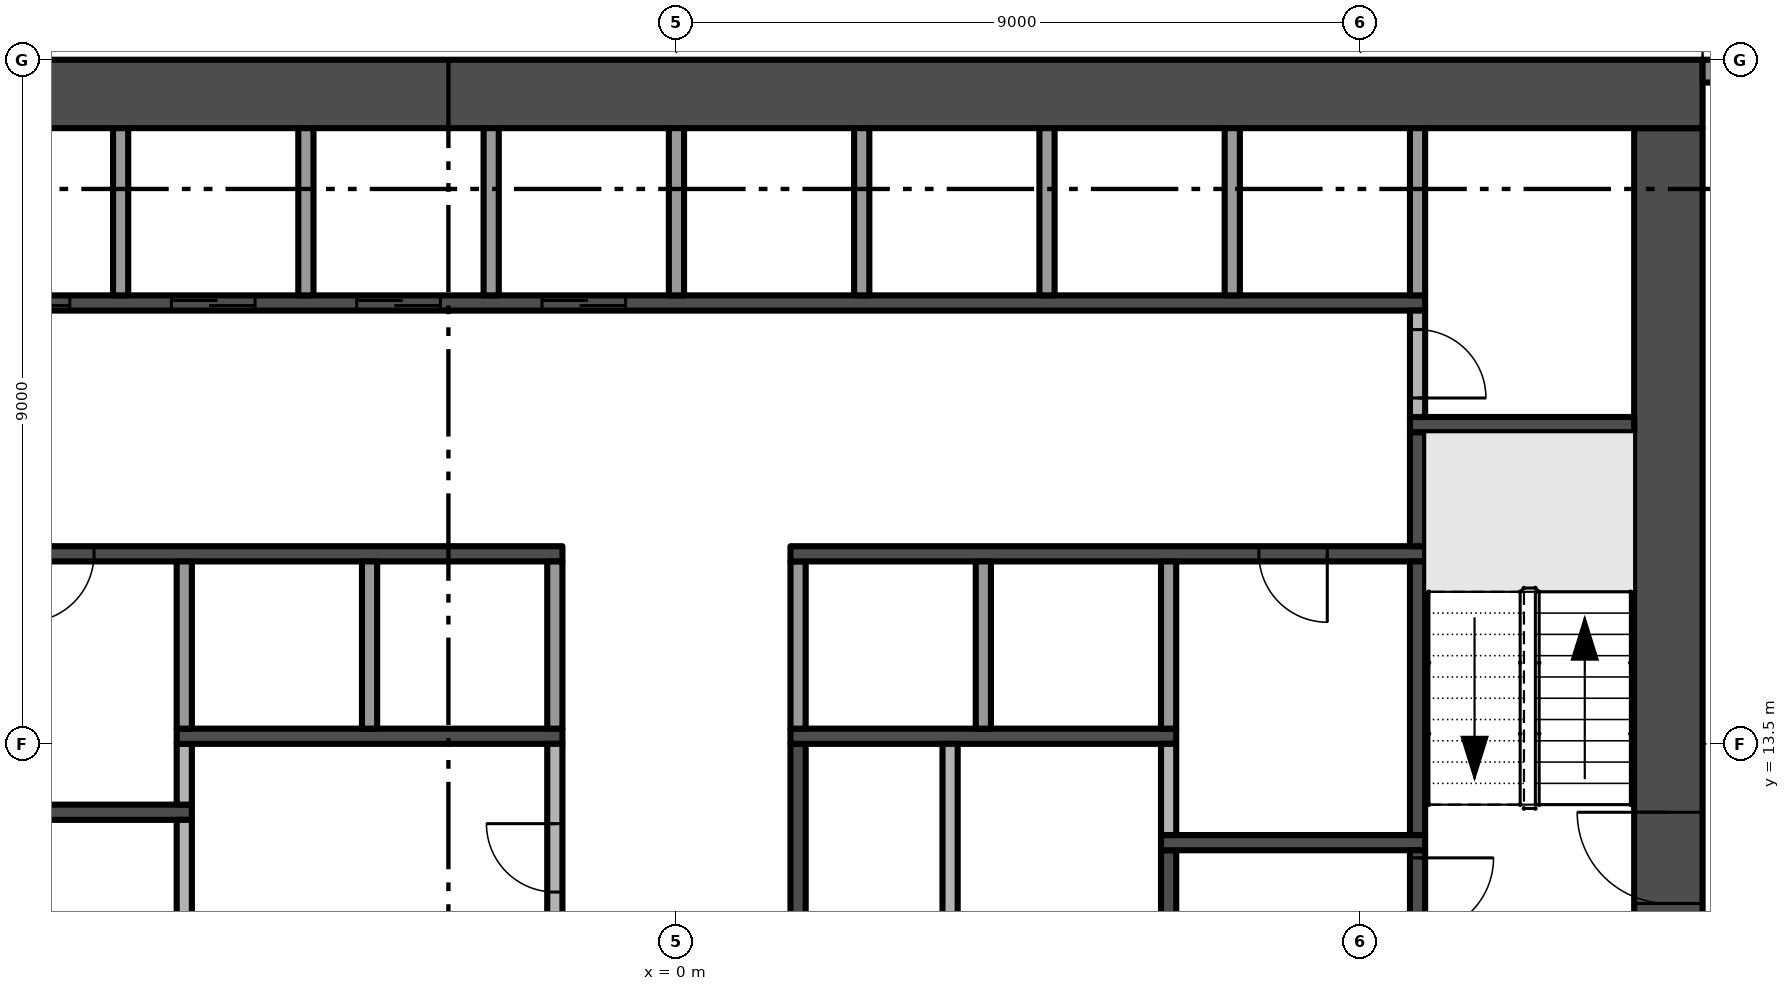
"""IFC4 building model, lengths in metres.
Left out: names, types, materials, properties, quantities, classifications, styles, units other than length and angle.
Written with IfcOpenShell. Run it as: python <this file> out.ifc"""

import sys

from ifc_helpers import new_model, si_unit, direction, frame, frame_2d, origin, place, context, subcontext, project, spatial, rectangle, extrude, element, fill, save


model = new_model("IFC4")
c1 = context("Model", 3, precision=1e-05, world=origin(), true_north=direction((0.0, 1.0)))
c2 = subcontext(c1, "Body", "Model", "MODEL_VIEW")
j1 = project(units=[si_unit("LENGTHUNIT", "METRE"), si_unit("PLANEANGLEUNIT", "RADIAN")], contexts=[c1])
p1 = place(None, origin())
s1 = spatial("IfcSite", under=j1, at=p1, CompositionType="ELEMENT")
p2 = place(p1, origin())
s2 = spatial("IfcBuilding", under=s1, at=p2, CompositionType="ELEMENT")
p3 = place(p2, frame((0.0, 0.0, 111.2)))
s3 = spatial("IfcBuildingStorey", under=s2, at=p3, CompositionType="ELEMENT", Elevation=111.2)
p4 = place(p3, frame((13.05, 5.4, -0.3), z_axis=(0.0, 0.0, 1.0), x_axis=(0.0, 1.0, 0.0)))
e1 = element("IfcWall", 1, at=p4, inside=s3, PredefinedType="SHEAR", context=c2, shape_type="SweptSolid", body=[
    extrude(rectangle(XDim=16.2, YDim=0.9, at=frame_2d((8.1, 0.0))), origin(), (0.0, 0.0, 1.0), 3.8),
])
p5 = place(p4, frame((6.0, 0.0, 0.3)))
e2 = element("IfcOpeningElement", 2, at=p5, cuts=e1, PredefinedType="OPENING", context=c2, shape_type="SweptSolid", body=[
    extrude(rectangle(XDim=1.2, YDim=2.2, at=frame_2d((0.6, 1.1))), frame((0.0, 0.46, 0.0), z_axis=(0.0, -1.0, 0.0), x_axis=(1.0, 0.0, 0.0)), (0.0, 0.0, 1.0), 0.92),
])
p6 = place(p3, frame((13.5, 22.05, -0.3), z_axis=(0.0, 0.0, 1.0), x_axis=(-1.0, 0.0, 0.0)))
e3 = element("IfcWall", 3, at=p6, inside=s3, PredefinedType="SHEAR", context=c2, shape_type="SweptSolid", body=[
    extrude(rectangle(XDim=27.0, YDim=0.9, at=frame_2d((13.5, 0.0))), origin(), (0.0, 0.0, 1.0), 3.8),
])
p7 = place(p3, frame((13.5, 22.35, 0.0), z_axis=(0.0, 0.0, 1.0), x_axis=(1.0, 0.0, 0.0)))
e4 = element("IfcWall", 4, at=p7, inside=s3, PredefinedType="SOLIDWALL", context=c2, shape_type="SweptSolid", body=[
    extrude(rectangle(XDim=3.875, YDim=0.3, at=frame_2d((1.938, 0.0))), origin(), (0.0, 0.0, 1.0), 3.5),
])
p8 = place(p7, frame((0.775, 0.0, 0.45)))
e5 = element("IfcOpeningElement", 5, at=p8, cuts=e4, PredefinedType="OPENING", context=c2, shape_type="SweptSolid", body=[
    extrude(rectangle(XDim=2.775, YDim=2.65, at=frame_2d((1.387, 1.325))), frame((0.0, 0.16, 0.0), z_axis=(0.0, -1.0, 0.0), x_axis=(1.0, 0.0, 0.0)), (0.0, 0.0, 1.0), 0.32),
])
p9 = place(p3, frame((-9.85, 12.6, 0.0), z_axis=(0.0, 0.0, 1.0), x_axis=(1.0, 0.0, 0.0)))
e6 = element("IfcWall", 6, at=p9, inside=s3, PredefinedType="SHEAR", context=c2, shape_type="SweptSolid", body=[
    extrude(rectangle(XDim=3.475, YDim=0.2, at=frame_2d((1.738, 0.0))), origin(), (0.0, 0.0, 1.0), 3.5),
])
p10 = place(p3, frame((-1.5, 16.0, 0.0), z_axis=(0.0, 0.0, 1.0), x_axis=(-1.0, 0.0, 0.0)))
e7 = element("IfcWall", 7, at=p10, inside=s3, PredefinedType="SHEAR", context=c2, shape_type="SweptSolid", body=[
    extrude(rectangle(XDim=8.35, YDim=0.2, at=frame_2d((4.175, 0.0))), origin(), (0.0, 0.0, 1.0), 3.5),
])
p11 = place(p10, frame((6.162, 0.0, 0.0)))
e8 = element("IfcOpeningElement", 8, at=p11, cuts=e7, PredefinedType="OPENING", context=c2, shape_type="SweptSolid", body=[
    extrude(rectangle(XDim=0.9, YDim=2.1, at=frame_2d((0.45, 1.05))), frame((0.0, 0.11, 0.0), z_axis=(0.0, -1.0, 0.0), x_axis=(1.0, 0.0, 0.0)), (0.0, 0.0, 1.0), 0.22),
])
p12 = place(p3, frame((-9.85, 19.3, 0.0), z_axis=(0.0, 0.0, 1.0), x_axis=(1.0, 0.0, 0.0)))
e9 = element("IfcWall", 9, at=p12, inside=s3, PredefinedType="SHEAR", context=c2, shape_type="SweptSolid", body=[
    extrude(rectangle(XDim=19.7, YDim=0.2, at=frame_2d((9.85, 0.0))), origin(), (0.0, 0.0, 1.0), 3.5),
])
p13 = place(p12, frame((0.769, 0.0, 0.0)))
e10 = element("IfcOpeningElement", 10, at=p13, cuts=e9, PredefinedType="OPENING", context=c2, shape_type="SweptSolid", body=[
    extrude(rectangle(XDim=1.1, YDim=2.1, at=frame_2d((0.55, 1.05))), frame((0.0, 0.11, 0.0), z_axis=(0.0, -1.0, 0.0), x_axis=(1.0, 0.0, 0.0)), (0.0, 0.0, 1.0), 0.22),
])
p14 = place(p12, frame((3.206, 0.0, 0.0)))
e11 = element("IfcOpeningElement", 11, at=p14, cuts=e9, PredefinedType="OPENING", context=c2, shape_type="SweptSolid", body=[
    extrude(rectangle(XDim=1.1, YDim=2.1, at=frame_2d((0.55, 1.05))), frame((0.0, 0.11, 0.0), z_axis=(0.0, -1.0, 0.0), x_axis=(1.0, 0.0, 0.0)), (0.0, 0.0, 1.0), 0.22),
])
p15 = place(p12, frame((5.644, 0.0, 0.0)))
e12 = element("IfcOpeningElement", 12, at=p15, cuts=e9, PredefinedType="OPENING", context=c2, shape_type="SweptSolid", body=[
    extrude(rectangle(XDim=1.1, YDim=2.1, at=frame_2d((0.55, 1.05))), frame((0.0, 0.11, 0.0), z_axis=(0.0, -1.0, 0.0), x_axis=(1.0, 0.0, 0.0)), (0.0, 0.0, 1.0), 0.22),
])
p16 = place(p12, frame((8.081, 0.0, 0.0)))
e13 = element("IfcOpeningElement", 13, at=p16, cuts=e9, PredefinedType="OPENING", context=c2, shape_type="SweptSolid", body=[
    extrude(rectangle(XDim=1.1, YDim=2.1, at=frame_2d((0.55, 1.05))), frame((0.0, 0.11, 0.0), z_axis=(0.0, -1.0, 0.0), x_axis=(1.0, 0.0, 0.0)), (0.0, 0.0, 1.0), 0.22),
])
p17 = place(p3, frame((-7.312, 19.4, 0.0), z_axis=(0.0, 0.0, 1.0), x_axis=(0.0, 1.0, 0.0)))
e14 = element("IfcWall", 14, at=p17, inside=s3, PredefinedType="PARTITIONING", context=c2, shape_type="SweptSolid", body=[
    extrude(rectangle(XDim=2.2, YDim=0.2, at=frame_2d((1.1, 0.0))), origin(), (0.0, 0.0, 1.0), 3.5),
])
p18 = place(p3, frame((-6.475, 10.5, 0.0), z_axis=(0.0, 0.0, 1.0), x_axis=(0.0, 1.0, 0.0)))
e15 = element("IfcWall", 15, at=p18, inside=s3, PredefinedType="PARTITIONING", context=c2, shape_type="SweptSolid", body=[
    extrude(rectangle(XDim=2.0, YDim=0.2, at=frame_2d((1.0, 0.0))), origin(), (0.0, 0.0, 1.0), 3.5),
])
p19 = place(p3, frame((-6.475, 12.7, 0.0), z_axis=(0.0, 0.0, 1.0), x_axis=(0.0, 1.0, 0.0)))
e16 = element("IfcWall", 16, at=p19, inside=s3, PredefinedType="PARTITIONING", context=c2, shape_type="SweptSolid", body=[
    extrude(rectangle(XDim=0.8, YDim=0.2, at=frame_2d((0.4, 0.0))), origin(), (0.0, 0.0, 1.0), 3.5),
])
p20 = place(p3, frame((-6.575, 13.6, 0.0), z_axis=(0.0, 0.0, 1.0), x_axis=(1.0, 0.0, 0.0)))
e17 = element("IfcWall", 17, at=p20, inside=s3, PredefinedType="SHEAR", context=c2, shape_type="SweptSolid", body=[
    extrude(rectangle(XDim=5.075, YDim=0.2, at=frame_2d((2.538, 0.0))), origin(), (0.0, 0.0, 1.0), 3.5),
])
for number, where, z_axis, x_axis in (
    (18, (-6.475, 13.7, 0.0), (0.0, 0.0, 1.0), (0.0, 1.0, 0.0)),
    (19, (-4.875, 19.4, 0.0), (0.0, 0.0, 1.0), (0.0, 1.0, 0.0)),
    (20, (-4.037, 13.7, 0.0), (0.0, 0.0, 1.0), (0.0, 1.0, 0.0)),
    (21, (-2.438, 19.4, 0.0), (0.0, 0.0, 1.0), (0.0, 1.0, 0.0)),
):
    element("IfcWall", number, at=place(p3, frame(where, z_axis=z_axis, x_axis=x_axis)), inside=s3, PredefinedType="PARTITIONING", context=c2, shape_type="SweptSolid", body=[
        extrude(rectangle(XDim=2.2, YDim=0.2, at=frame_2d((1.1, 0.0))), origin(), (0.0, 0.0, 1.0), 3.5),
    ])
p21 = place(p3, frame((-1.6, 10.5, 0.0), z_axis=(0.0, 0.0, 1.0), x_axis=(0.0, 1.0, 0.0)))
e22 = element("IfcWall", 22, at=p21, inside=s3, PredefinedType="PARTITIONING", context=c2, shape_type="SweptSolid", body=[
    extrude(rectangle(XDim=3.0, YDim=0.2, at=frame_2d((1.5, 0.0))), origin(), (0.0, 0.0, 1.0), 3.5),
])
p22 = place(p21, frame((1.05, 0.0, 0.0)))
e23 = element("IfcOpeningElement", 23, at=p22, cuts=e22, PredefinedType="OPENING", context=c2, shape_type="SweptSolid", body=[
    extrude(rectangle(XDim=0.9, YDim=2.1, at=frame_2d((0.45, 1.05))), frame((0.0, 0.11, 0.0), z_axis=(0.0, -1.0, 0.0), x_axis=(1.0, 0.0, 0.0)), (0.0, 0.0, 1.0), 0.22),
])
for number, where, z_axis, x_axis in (
    (24, (-1.6, 13.7, 0.0), (0.0, 0.0, 1.0), (0.0, 1.0, 0.0)),
    (25, (0.0, 19.4, 0.0), (0.0, 0.0, 1.0), (0.0, 1.0, 0.0)),
):
    element("IfcWall", number, at=place(p3, frame(where, z_axis=z_axis, x_axis=x_axis)), inside=s3, PredefinedType="PARTITIONING", context=c2, shape_type="SweptSolid", body=[
        extrude(rectangle(XDim=2.2, YDim=0.2, at=frame_2d((1.1, 0.0))), origin(), (0.0, 0.0, 1.0), 3.5),
    ])
p23 = place(p3, frame((1.6, 13.5, 0.0), z_axis=(0.0, 0.0, 1.0), x_axis=(0.0, -1.0, 0.0)))
e26 = element("IfcWall", 26, at=p23, inside=s3, PredefinedType="SHEAR", context=c2, shape_type="SweptSolid", body=[
    extrude(rectangle(XDim=8.1, YDim=0.2, at=frame_2d((4.05, 0.0))), origin(), (0.0, 0.0, 1.0), 3.5),
])
p24 = place(p23, frame((3.2, 0.0, 0.0)))
e27 = element("IfcOpeningElement", 27, at=p24, cuts=e26, PredefinedType="OPENING", context=c2, shape_type="SweptSolid", body=[
    extrude(rectangle(XDim=0.9, YDim=2.1, at=frame_2d((0.45, 1.05))), frame((0.0, 0.11, 0.0), z_axis=(0.0, -1.0, 0.0), x_axis=(1.0, 0.0, 0.0)), (0.0, 0.0, 1.0), 0.22),
])
p25 = place(p3, frame((1.5, 13.6, 0.0), z_axis=(0.0, 0.0, 1.0), x_axis=(1.0, 0.0, 0.0)))
e28 = element("IfcWall", 28, at=p25, inside=s3, PredefinedType="SHEAR", context=c2, shape_type="SweptSolid", body=[
    extrude(rectangle(XDim=5.075, YDim=0.2, at=frame_2d((2.538, 0.0))), origin(), (0.0, 0.0, 1.0), 3.5),
])
p26 = place(p3, frame((1.6, 13.7, 0.0), z_axis=(0.0, 0.0, 1.0), x_axis=(0.0, 1.0, 0.0)))
e29 = element("IfcWall", 29, at=p26, inside=s3, PredefinedType="PARTITIONING", context=c2, shape_type="SweptSolid", body=[
    extrude(rectangle(XDim=2.2, YDim=0.2, at=frame_2d((1.1, 0.0))), origin(), (0.0, 0.0, 1.0), 3.5),
])
p27 = place(p3, frame((9.85, 16.0, 0.0), z_axis=(0.0, 0.0, 1.0), x_axis=(-1.0, 0.0, 0.0)))
e30 = element("IfcWall", 30, at=p27, inside=s3, PredefinedType="SHEAR", context=c2, shape_type="SweptSolid", body=[
    extrude(rectangle(XDim=8.35, YDim=0.2, at=frame_2d((4.175, 0.0))), origin(), (0.0, 0.0, 1.0), 3.5),
])
p28 = place(p27, frame((1.288, 0.0, 0.0)))
e31 = element("IfcOpeningElement", 31, at=p28, cuts=e30, PredefinedType="OPENING", context=c2, shape_type="SweptSolid", body=[
    extrude(rectangle(XDim=0.9, YDim=2.1, at=frame_2d((0.45, 1.05))), frame((0.0, 0.11, 0.0), z_axis=(0.0, -1.0, 0.0), x_axis=(1.0, 0.0, 0.0)), (0.0, 0.0, 1.0), 0.22),
])
p29 = place(p3, frame((2.438, 19.4, 0.0), z_axis=(0.0, 0.0, 1.0), x_axis=(0.0, 1.0, 0.0)))
e32 = element("IfcWall", 32, at=p29, inside=s3, PredefinedType="PARTITIONING", context=c2, shape_type="SweptSolid", body=[
    extrude(rectangle(XDim=2.2, YDim=0.2, at=frame_2d((1.1, 0.0))), origin(), (0.0, 0.0, 1.0), 3.5),
])
p30 = place(p3, frame((3.6, 13.5, 0.0), z_axis=(0.0, 0.0, 1.0), x_axis=(0.0, -1.0, 0.0)))
e33 = element("IfcWall", 33, at=p30, inside=s3, PredefinedType="PARTITIONING", context=c2, shape_type="SweptSolid", body=[
    extrude(rectangle(XDim=8.1, YDim=0.2, at=frame_2d((4.05, 0.0))), origin(), (0.0, 0.0, 1.0), 3.5),
])
p31 = place(p30, frame((3.6, 0.0, 0.0)))
e34 = element("IfcOpeningElement", 34, at=p31, cuts=e33, PredefinedType="OPENING", context=c2, shape_type="SweptSolid", body=[
    extrude(rectangle(XDim=0.9, YDim=2.1, at=frame_2d((0.45, 1.05))), frame((0.0, 0.11, 0.0), z_axis=(0.0, -1.0, 0.0), x_axis=(1.0, 0.0, 0.0)), (0.0, 0.0, 1.0), 0.22),
])
for number, where, z_axis, x_axis in (
    (35, (4.037, 13.7, 0.0), (0.0, 0.0, 1.0), (0.0, 1.0, 0.0)),
    (36, (4.875, 19.4, 0.0), (0.0, 0.0, 1.0), (0.0, 1.0, 0.0)),
):
    element("IfcWall", number, at=place(p3, frame(where, z_axis=z_axis, x_axis=x_axis)), inside=s3, PredefinedType="PARTITIONING", context=c2, shape_type="SweptSolid", body=[
        extrude(rectangle(XDim=2.2, YDim=0.2, at=frame_2d((1.1, 0.0))), origin(), (0.0, 0.0, 1.0), 3.5),
    ])
p32 = place(p3, frame((6.475, 5.4, 0.0), z_axis=(0.0, 0.0, 1.0), x_axis=(0.0, 1.0, 0.0)))
e37 = element("IfcWall", 37, at=p32, inside=s3, PredefinedType="SHEAR", context=c2, shape_type="SweptSolid", body=[
    extrude(rectangle(XDim=6.7, YDim=0.2, at=frame_2d((3.35, 0.0))), origin(), (0.0, 0.0, 1.0), 3.5),
])
p33 = place(p3, frame((6.375, 12.2, 0.0), z_axis=(0.0, 0.0, 1.0), x_axis=(1.0, 0.0, 0.0)))
e38 = element("IfcWall", 38, at=p33, inside=s3, PredefinedType="SHEAR", context=c2, shape_type="SweptSolid", body=[
    extrude(rectangle(XDim=3.475, YDim=0.2, at=frame_2d((1.738, 0.0))), origin(), (0.0, 0.0, 1.0), 3.5),
])
p34 = place(p3, frame((6.475, 12.3, 0.0), z_axis=(0.0, 0.0, 1.0), x_axis=(0.0, 1.0, 0.0)))
e39 = element("IfcWall", 39, at=p34, inside=s3, PredefinedType="PARTITIONING", context=c2, shape_type="SweptSolid", body=[
    extrude(rectangle(XDim=1.2, YDim=0.2, at=frame_2d((0.6, 0.0))), origin(), (0.0, 0.0, 1.0), 3.5),
])
for number, where, z_axis, x_axis in (
    (40, (6.475, 13.7, 0.0), (0.0, 0.0, 1.0), (0.0, 1.0, 0.0)),
    (41, (7.312, 19.4, 0.0), (0.0, 0.0, 1.0), (0.0, 1.0, 0.0)),
):
    element("IfcWall", number, at=place(p3, frame(where, z_axis=z_axis, x_axis=x_axis)), inside=s3, PredefinedType="PARTITIONING", context=c2, shape_type="SweptSolid", body=[
        extrude(rectangle(XDim=2.2, YDim=0.2, at=frame_2d((1.1, 0.0))), origin(), (0.0, 0.0, 1.0), 3.5),
    ])
p35 = place(p3, frame((9.75, 12.1, 0.0), z_axis=(0.0, 0.0, 1.0), x_axis=(0.0, -1.0, 0.0)))
e42 = element("IfcWall", 42, at=p35, inside=s3, PredefinedType="SHEAR", context=c2, shape_type="SweptSolid", body=[
    extrude(rectangle(XDim=1.9, YDim=0.2, at=frame_2d((0.95, 0.0))), origin(), (0.0, 0.0, 1.0), 3.5),
])
p36 = place(p35, frame((0.1, 0.0, 0.0)))
e43 = element("IfcOpeningElement", 43, at=p36, cuts=e42, PredefinedType="OPENING", context=c2, shape_type="SweptSolid", body=[
    extrude(rectangle(XDim=1.0, YDim=2.2, at=frame_2d((0.5, 1.1))), frame((0.0, 0.11, 0.0), z_axis=(0.0, -1.0, 0.0), x_axis=(1.0, 0.0, 0.0)), (0.0, 0.0, 1.0), 0.22),
])
p37 = place(p3, frame((9.75, 12.3, 0.0), z_axis=(0.0, 0.0, 1.0), x_axis=(0.0, 1.0, 0.0)))
e44 = element("IfcWall", 44, at=p37, inside=s3, PredefinedType="SHEAR", context=c2, shape_type="SweptSolid", body=[
    extrude(rectangle(XDim=3.6, YDim=0.2, at=frame_2d((1.8, 0.0))), origin(), (0.0, 0.0, 1.0), 3.5),
])
p38 = place(p3, frame((9.75, 16.1, 0.0), z_axis=(0.0, 0.0, 1.0), x_axis=(0.0, 1.0, 0.0)))
e45 = element("IfcWall", 45, at=p38, inside=s3, PredefinedType="SHEAR", context=c2, shape_type="SweptSolid", body=[
    extrude(rectangle(XDim=1.5, YDim=0.2, at=frame_2d((0.75, 0.0))), origin(), (0.0, 0.0, 1.0), 3.5),
])
p39 = place(p3, frame((9.65, 17.7, 0.0), z_axis=(0.0, 0.0, 1.0), x_axis=(1.0, 0.0, 0.0)))
e46 = element("IfcWall", 46, at=p39, inside=s3, PredefinedType="SHEAR", context=c2, shape_type="SweptSolid", body=[
    extrude(rectangle(XDim=2.95, YDim=0.2, at=frame_2d((1.475, 0.0))), origin(), (0.0, 0.0, 1.0), 3.5),
])
p40 = place(p3, frame((9.75, 19.2, 0.0), z_axis=(0.0, 0.0, 1.0), x_axis=(0.0, -1.0, 0.0)))
e47 = element("IfcWall", 47, at=p40, inside=s3, PredefinedType="PARTITIONING", context=c2, shape_type="SweptSolid", body=[
    extrude(rectangle(XDim=1.4, YDim=0.2, at=frame_2d((0.7, 0.0))), origin(), (0.0, 0.0, 1.0), 3.5),
])
p41 = place(p40, frame((0.25, 0.0, 0.0)))
e48 = element("IfcOpeningElement", 48, at=p41, cuts=e47, PredefinedType="OPENING", context=c2, shape_type="SweptSolid", body=[
    extrude(rectangle(XDim=0.9, YDim=2.1, at=frame_2d((0.45, 1.05))), frame((0.0, 0.11, 0.0), z_axis=(0.0, -1.0, 0.0), x_axis=(1.0, 0.0, 0.0)), (0.0, 0.0, 1.0), 0.22),
])
p42 = place(p3, frame((9.75, 19.4, 0.0), z_axis=(0.0, 0.0, 1.0), x_axis=(0.0, 1.0, 0.0)))
e49 = element("IfcWall", 49, at=p42, inside=s3, PredefinedType="PARTITIONING", context=c2, shape_type="SweptSolid", body=[
    extrude(rectangle(XDim=2.2, YDim=0.2, at=frame_2d((1.1, 0.0))), origin(), (0.0, 0.0, 1.0), 3.5),
])
p43 = place(p5, frame((1.2, 0.0, 0.0), z_axis=(0.0, 0.0, 1.0), x_axis=(-1.0, 0.0, 0.0)))
e50 = element("IfcDoor", 50, at=p43, inside=s3, OperationType="SINGLE_SWING_LEFT", PredefinedType="DOOR", context=c2, shape_type="SweptSolid", body=[
    extrude(rectangle(XDim=1.2, YDim=2.2, at=frame_2d((0.6, 1.1))), frame((0.0, 0.025, 0.0), z_axis=(0.0, -1.0, 0.0), x_axis=(1.0, 0.0, 0.0)), (0.0, 0.0, 1.0), 0.05),
])
fill(e2, e50)
p44 = place(p36, origin())
e51 = element("IfcDoor", 51, at=p44, inside=s3, OperationType="SINGLE_SWING_LEFT", PredefinedType="DOOR", context=c2, shape_type="SweptSolid", body=[
    extrude(rectangle(XDim=1.0, YDim=2.2, at=frame_2d((0.5, 1.1))), frame((0.0, 0.025, 0.0), z_axis=(0.0, -1.0, 0.0), x_axis=(1.0, 0.0, 0.0)), (0.0, 0.0, 1.0), 0.05),
])
fill(e43, e51)
p45 = place(p13, origin())
e52 = element("IfcDoor", 52, at=p45, inside=s3, OperationType="SLIDING_TO_LEFT", PredefinedType="DOOR", context=c2, shape_type="SweptSolid", body=[
    extrude(rectangle(XDim=1.1, YDim=2.1, at=frame_2d((0.55, 1.05))), frame((0.0, 0.025, 0.0), z_axis=(0.0, -1.0, 0.0), x_axis=(1.0, 0.0, 0.0)), (0.0, 0.0, 1.0), 0.05),
])
fill(e10, e52)
p46 = place(p14, origin())
e53 = element("IfcDoor", 53, at=p46, inside=s3, OperationType="SLIDING_TO_LEFT", PredefinedType="DOOR", context=c2, shape_type="SweptSolid", body=[
    extrude(rectangle(XDim=1.1, YDim=2.1, at=frame_2d((0.55, 1.05))), frame((0.0, 0.025, 0.0), z_axis=(0.0, -1.0, 0.0), x_axis=(1.0, 0.0, 0.0)), (0.0, 0.0, 1.0), 0.05),
])
fill(e11, e53)
p47 = place(p15, origin())
e54 = element("IfcDoor", 54, at=p47, inside=s3, OperationType="SLIDING_TO_LEFT", PredefinedType="DOOR", context=c2, shape_type="SweptSolid", body=[
    extrude(rectangle(XDim=1.1, YDim=2.1, at=frame_2d((0.55, 1.05))), frame((0.0, 0.025, 0.0), z_axis=(0.0, -1.0, 0.0), x_axis=(1.0, 0.0, 0.0)), (0.0, 0.0, 1.0), 0.05),
])
fill(e12, e54)
p48 = place(p16, origin())
e55 = element("IfcDoor", 55, at=p48, inside=s3, OperationType="SLIDING_TO_LEFT", PredefinedType="DOOR", context=c2, shape_type="SweptSolid", body=[
    extrude(rectangle(XDim=1.1, YDim=2.1, at=frame_2d((0.55, 1.05))), frame((0.0, 0.025, 0.0), z_axis=(0.0, -1.0, 0.0), x_axis=(1.0, 0.0, 0.0)), (0.0, 0.0, 1.0), 0.05),
])
fill(e13, e55)
p49 = place(p11, origin())
e56 = element("IfcDoor", 56, at=p49, inside=s3, OperationType="SINGLE_SWING_RIGHT", PredefinedType="DOOR", context=c2, shape_type="SweptSolid", body=[
    extrude(rectangle(XDim=0.9, YDim=2.1, at=frame_2d((0.45, 1.05))), frame((0.0, 0.025, 0.0), z_axis=(0.0, -1.0, 0.0), x_axis=(1.0, 0.0, 0.0)), (0.0, 0.0, 1.0), 0.05),
])
fill(e8, e56)
p50 = place(p22, origin())
e57 = element("IfcDoor", 57, at=p50, inside=s3, OperationType="SINGLE_SWING_RIGHT", PredefinedType="DOOR", context=c2, shape_type="SweptSolid", body=[
    extrude(rectangle(XDim=0.9, YDim=2.1, at=frame_2d((0.45, 1.05))), frame((0.0, 0.025, 0.0), z_axis=(0.0, -1.0, 0.0), x_axis=(1.0, 0.0, 0.0)), (0.0, 0.0, 1.0), 0.05),
])
fill(e23, e57)
p51 = place(p28, origin())
e58 = element("IfcDoor", 58, at=p51, inside=s3, OperationType="SINGLE_SWING_LEFT", PredefinedType="DOOR", context=c2, shape_type="SweptSolid", body=[
    extrude(rectangle(XDim=0.9, YDim=2.1, at=frame_2d((0.45, 1.05))), frame((0.0, 0.025, 0.0), z_axis=(0.0, -1.0, 0.0), x_axis=(1.0, 0.0, 0.0)), (0.0, 0.0, 1.0), 0.05),
])
fill(e31, e58)
p52 = place(p41, origin())
e59 = element("IfcDoor", 59, at=p52, inside=s3, OperationType="SINGLE_SWING_RIGHT", PredefinedType="DOOR", context=c2, shape_type="SweptSolid", body=[
    extrude(rectangle(XDim=0.9, YDim=2.1, at=frame_2d((0.45, 1.05))), frame((0.0, 0.025, 0.0), z_axis=(0.0, -1.0, 0.0), x_axis=(1.0, 0.0, 0.0)), (0.0, 0.0, 1.0), 0.05),
])
fill(e48, e59)
save(model, sys.argv[1])
